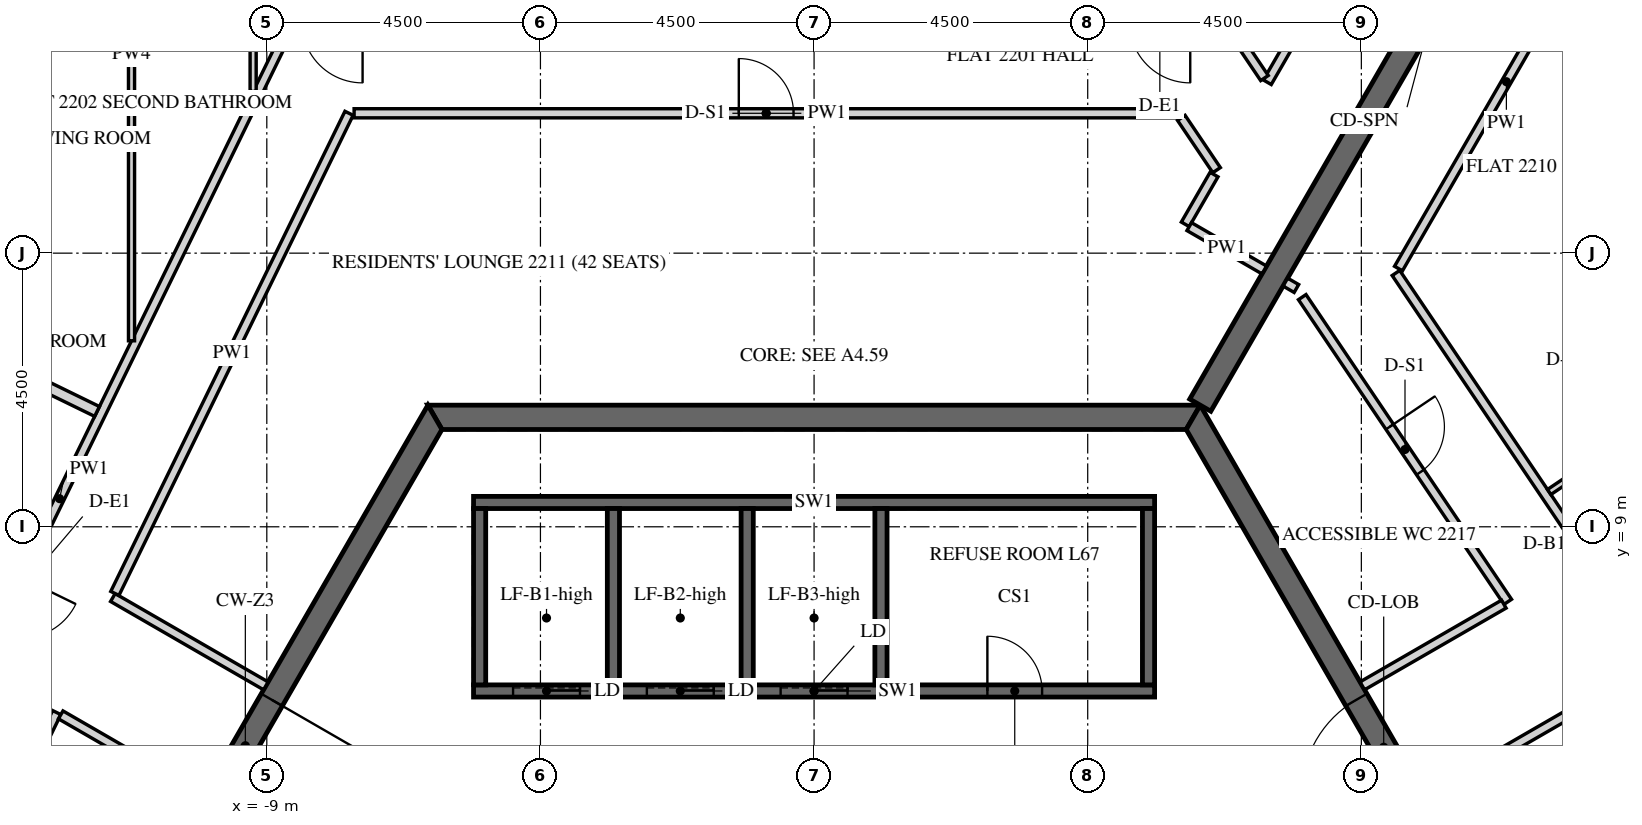
"""IFC4 building model, lengths in metres.
Left out: names, types, materials, properties, quantities, classifications, styles, units other than length and angle.
Written with IfcOpenShell. Run it as: python <this file> out.ifc"""

import sys

from ifc_helpers import new_model, si_unit, direction, frame, frame_2d, origin, place, context, subcontext, project, spatial, polyline, rectangle, outline, extrude, element, fill, save


model = new_model("IFC4")
c1 = context("Model", 3, precision=1e-05, world=origin(), true_north=direction((0.0, 1.0)))
c2 = subcontext(c1, "Body", "Model", "MODEL_VIEW")
j1 = project(units=[si_unit("LENGTHUNIT", "METRE"), si_unit("PLANEANGLEUNIT", "RADIAN")], contexts=[c1])
p1 = place(None, origin())
s1 = spatial("IfcSite", under=j1, at=p1, CompositionType="ELEMENT")
p2 = place(p1, origin())
s2 = spatial("IfcBuilding", under=s1, at=p2, CompositionType="ELEMENT")
p3 = place(p2, frame((0.0, 0.0, 279.6)))
s3 = spatial("IfcBuildingStorey", under=s2, at=p3, CompositionType="ELEMENT", Elevation=279.6)
p4 = place(p3, frame((-6.235, 10.8, -0.15), z_axis=(0.0, 0.0, 1.0), x_axis=(-0.499996419489, -0.866027470984, 0.0)))
e1 = element("IfcWall", 1, at=p4, inside=s3, PredefinedType="SHEAR", context=c2, shape_type="SweptSolid", body=[
    extrude(outline(polyline([(-0.115, -0.2), (12.586, -0.2), (12.355, 0.2), (0.115, 0.2), (-0.115, -0.2)])), origin(), (0.0, 0.0, 1.0), 3.9),
])
p5 = place(p4, frame((5.364, 0.0, 0.15)))
e2 = element("IfcOpeningElement", 2, at=p5, cuts=e1, PredefinedType="OPENING", context=c2, shape_type="SweptSolid", body=[
    extrude(rectangle(XDim=1.8, YDim=2.4, at=frame_2d((0.9, 1.2))), frame((0.0, 0.21, 0.0), z_axis=(0.0, -1.0, 0.0), x_axis=(1.0, 0.0, 0.0)), (0.0, 0.0, 1.0), 0.42),
])
p6 = place(p3, frame((12.471, 0.0, -0.15), z_axis=(0.0, 0.0, 1.0), x_axis=(-0.499996419489, 0.866027470984, 0.0)))
e3 = element("IfcWall", 3, at=p6, inside=s3, PredefinedType="SHEAR", context=c2, shape_type="SweptSolid", body=[
    extrude(outline(polyline([(-0.115, -0.2), (12.586, -0.2), (12.355, 0.2), (0.115, 0.2), (-0.115, -0.2)])), origin(), (0.0, 0.0, 1.0), 3.9),
])
p7 = place(p6, frame((5.306, 0.0, 0.15)))
e4 = element("IfcOpeningElement", 4, at=p7, cuts=e3, PredefinedType="OPENING", context=c2, shape_type="SweptSolid", body=[
    extrude(rectangle(XDim=1.8, YDim=2.4, at=frame_2d((0.9, 1.2))), frame((0.0, 0.21, 0.0), z_axis=(0.0, -1.0, 0.0), x_axis=(1.0, 0.0, 0.0)), (0.0, 0.0, 1.0), 0.42),
])
p8 = place(p3, frame((6.235, 10.8, -0.15), z_axis=(0.0, 0.0, 1.0), x_axis=(-1.0, 0.0, 0.0)))
e5 = element("IfcWall", 5, at=p8, inside=s3, PredefinedType="SHEAR", context=c2, shape_type="SweptSolid", body=[
    extrude(outline(polyline([(-0.115, -0.2), (12.586, -0.2), (12.355, 0.2), (0.115, 0.2), (-0.115, -0.2)])), origin(), (0.0, 0.0, 1.0), 3.9),
])
p9 = place(p3, frame((6.351, 11.0, -0.15), z_axis=(0.0, 0.0, 1.0), x_axis=(0.499998894578, 0.866026041999, 0.0)))
e6 = element("IfcWall", 6, at=p9, inside=s3, PredefinedType="SHEAR", context=c2, shape_type="SweptSolid", body=[
    extrude(rectangle(XDim=15.544, YDim=0.4, at=frame_2d((7.772, 0.0))), origin(), (0.0, 0.0, 1.0), 3.9),
])
p10 = place(p9, frame((6.872, 0.0, 0.15)))
e7 = element("IfcOpeningElement", 7, at=p10, cuts=e6, PredefinedType="OPENING", context=c2, shape_type="SweptSolid", body=[
    extrude(rectangle(XDim=1.8, YDim=2.4, at=frame_2d((0.9, 1.2))), frame((0.0, 0.21, 0.0), z_axis=(0.0, -1.0, 0.0), x_axis=(1.0, 0.0, 0.0)), (0.0, 0.0, 1.0), 0.42),
])
p11 = place(p3, frame((-5.6, 6.3, -0.25), z_axis=(0.0, 0.0, 1.0), x_axis=(1.0, 0.0, 0.0)))
e8 = element("IfcWall", 8, at=p11, inside=s3, PredefinedType="SHEAR", context=c2, shape_type="SweptSolid", body=[
    extrude(rectangle(XDim=11.2, YDim=0.2, at=frame_2d((5.6, 0.0))), origin(), (0.0, 0.0, 1.0), 3.9),
])
p12 = place(p11, frame((8.45, 0.0, 0.25)))
e9 = element("IfcOpeningElement", 9, at=p12, cuts=e8, PredefinedType="OPENING", context=c2, shape_type="SweptSolid", body=[
    extrude(rectangle(XDim=0.9, YDim=2.1, at=frame_2d((0.45, 1.05))), frame((0.0, 0.11, 0.0), z_axis=(0.0, -1.0, 0.0), x_axis=(1.0, 0.0, 0.0)), (0.0, 0.0, 1.0), 0.22),
])
p13 = place(p11, frame((0.65, 0.0, 0.25)))
e10 = element("IfcOpeningElement", 10, at=p13, cuts=e8, PredefinedType="OPENING", context=c2, shape_type="SweptSolid", body=[
    extrude(rectangle(XDim=1.1, YDim=2.1, at=frame_2d((0.55, 1.05))), frame((0.0, 0.11, 0.0), z_axis=(0.0, -1.0, 0.0), x_axis=(1.0, 0.0, 0.0)), (0.0, 0.0, 1.0), 0.22),
])
p14 = place(p11, frame((2.85, 0.0, 0.25)))
e11 = element("IfcOpeningElement", 11, at=p14, cuts=e8, PredefinedType="OPENING", context=c2, shape_type="SweptSolid", body=[
    extrude(rectangle(XDim=1.1, YDim=2.1, at=frame_2d((0.55, 1.05))), frame((0.0, 0.11, 0.0), z_axis=(0.0, -1.0, 0.0), x_axis=(1.0, 0.0, 0.0)), (0.0, 0.0, 1.0), 0.22),
])
p15 = place(p11, frame((5.05, 0.0, 0.25)))
e12 = element("IfcOpeningElement", 12, at=p15, cuts=e8, PredefinedType="OPENING", context=c2, shape_type="SweptSolid", body=[
    extrude(rectangle(XDim=1.1, YDim=2.1, at=frame_2d((0.55, 1.05))), frame((0.0, 0.11, 0.0), z_axis=(0.0, -1.0, 0.0), x_axis=(1.0, 0.0, 0.0)), (0.0, 0.0, 1.0), 0.22),
])
p16 = place(p3, frame((-5.6, 9.4, -0.25), z_axis=(0.0, 0.0, 1.0), x_axis=(1.0, 0.0, 0.0)))
e13 = element("IfcWall", 13, at=p16, inside=s3, PredefinedType="SHEAR", context=c2, shape_type="SweptSolid", body=[
    extrude(rectangle(XDim=11.2, YDim=0.2, at=frame_2d((5.6, 0.0))), origin(), (0.0, 0.0, 1.0), 3.9),
])
for number, where, z_axis, x_axis in (
    (14, (-5.5, 6.4, -0.25), (0.0, 0.0, 1.0), (0.0, 1.0, 0.0)),
    (15, (-3.3, 6.4, -0.25), (0.0, 0.0, 1.0), (0.0, 1.0, 0.0)),
    (16, (-1.1, 6.4, -0.25), (0.0, 0.0, 1.0), (0.0, 1.0, 0.0)),
    (17, (1.1, 6.4, -0.25), (0.0, 0.0, 1.0), (0.0, 1.0, 0.0)),
    (18, (5.5, 6.4, -0.25), (0.0, 0.0, 1.0), (0.0, 1.0, 0.0)),
):
    element("IfcWall", number, at=place(p3, frame(where, z_axis=z_axis, x_axis=x_axis)), inside=s3, PredefinedType="SHEAR", context=c2, shape_type="SweptSolid", body=[
        extrude(rectangle(XDim=2.9, YDim=0.2, at=frame_2d((1.45, 0.0))), origin(), (0.0, 0.0, 1.0), 3.9),
    ])
p17 = place(p3, frame((8.711, 18.488, 0.0), z_axis=(0.0, 0.0, 1.0), x_axis=(-0.500075402517, -0.865981865744, 0.0)))
e19 = element("IfcWall", 19, at=p17, inside=s3, PredefinedType="PARTITIONING", context=c2, shape_type="SweptSolid", body=[
    extrude(rectangle(XDim=2.515, YDim=0.15, at=frame_2d((1.257, 0.0))), origin(), (0.0, 0.0, 1.0), 2.988),
])
p18 = place(p3, frame((7.407, 16.379, 0.0), z_axis=(0.0, 0.0, 1.0), x_axis=(-0.559111060147, 0.829092770697, 0.0)))
e20 = element("IfcWall", 20, at=p18, inside=s3, PredefinedType="PARTITIONING", context=c2, shape_type="SweptSolid", body=[
    extrude(rectangle(XDim=1.02, YDim=0.15, at=frame_2d((0.51, 0.0))), origin(), (0.0, 0.0, 1.0), 2.988),
])
p19 = place(p3, frame((-8.622, 17.225, 0.0), z_axis=(0.0, 0.0, 1.0), x_axis=(-0.438366544921, -0.898796290765, 0.0)))
e21 = element("IfcWall", 21, at=p19, inside=s3, PredefinedType="PARTITIONING", context=c2, shape_type="SweptSolid", body=[
    extrude(rectangle(XDim=17.273, YDim=0.15, at=frame_2d((8.637, 0.0))), origin(), (0.0, 0.0, 1.0), 2.988),
])
p20 = place(p19, frame((10.078, 0.0, 0.0)))
e22 = element("IfcOpeningElement", 22, at=p20, cuts=e21, PredefinedType="OPENING", context=c2, shape_type="SweptSolid", body=[
    extrude(rectangle(XDim=1.0, YDim=2.1, at=frame_2d((0.5, 1.05))), frame((0.0, 0.085, 0.0), z_axis=(0.0, -1.0, 0.0), x_axis=(1.0, 0.0, 0.0)), (0.0, 0.0, 1.0), 0.17),
])
p21 = place(p3, frame((-9.016, 6.384, 0.0), z_axis=(0.0, 0.0, 1.0), x_axis=(-0.866010648346, 0.500025556299, 0.0)))
e23 = element("IfcWall", 23, at=p21, inside=s3, PredefinedType="PARTITIONING", context=c2, shape_type="SweptSolid", body=[
    extrude(rectangle(XDim=2.905, YDim=0.15, at=frame_2d((1.453, 0.0))), origin(), (0.0, 0.0, 1.0), 2.988),
])
p22 = place(p3, frame((-11.499, 7.905, 0.0), z_axis=(0.0, 0.0, 1.0), x_axis=(0.438365041944, 0.898797023805, 0.0)))
e24 = element("IfcWall", 24, at=p22, inside=s3, PredefinedType="PARTITIONING", context=c2, shape_type="SweptSolid", body=[
    extrude(rectangle(XDim=8.784, YDim=0.15, at=frame_2d((4.392, 0.0))), origin(), (0.0, 0.0, 1.0), 2.988),
])
p23 = place(p3, frame((-7.564, 15.8, 0.0), z_axis=(0.0, 0.0, 1.0), x_axis=(1.0, 0.0, 0.0)))
e25 = element("IfcWall", 25, at=p23, inside=s3, PredefinedType="PARTITIONING", context=c2, shape_type="SweptSolid", body=[
    extrude(rectangle(XDim=13.553, YDim=0.15, at=frame_2d((6.776, 0.0))), origin(), (0.0, 0.0, 1.0), 2.988),
])
p24 = place(p23, frame((6.326, 0.0, 0.0)))
e26 = element("IfcOpeningElement", 26, at=p24, cuts=e25, PredefinedType="OPENING", context=c2, shape_type="SweptSolid", body=[
    extrude(rectangle(XDim=0.9, YDim=2.1, at=frame_2d((0.45, 1.05))), frame((0.0, 0.085, 0.0), z_axis=(0.0, -1.0, 0.0), x_axis=(1.0, 0.0, 0.0)), (0.0, 0.0, 1.0), 0.17),
])
p25 = place(p3, frame((6.039, 15.725, 0.0), z_axis=(0.0, 0.0, 1.0), x_axis=(0.559307154107, -0.828960498073, 0.0)))
e27 = element("IfcWall", 27, at=p25, inside=s3, PredefinedType="PARTITIONING", context=c2, shape_type="SweptSolid", body=[
    extrude(rectangle(XDim=1.038, YDim=0.15, at=frame_2d((0.519, 0.0))), origin(), (0.0, 0.0, 1.0), 2.988),
])
p26 = place(p3, frame((6.578, 14.793, 0.0), z_axis=(0.0, 0.0, 1.0), x_axis=(-0.499998034377, -0.866026538634, 0.0)))
e28 = element("IfcWall", 28, at=p26, inside=s3, PredefinedType="PARTITIONING", context=c2, shape_type="SweptSolid", body=[
    extrude(rectangle(XDim=0.946, YDim=0.15, at=frame_2d((0.473, 0.0))), origin(), (0.0, 0.0, 1.0), 2.988),
])
p27 = place(p3, frame((6.17, 13.936, 0.0), z_axis=(0.0, 0.0, 1.0), x_axis=(0.865988727248, -0.500063520245, 0.0)))
e29 = element("IfcWall", 29, at=p27, inside=s3, PredefinedType="PARTITIONING", context=c2, shape_type="SweptSolid", body=[
    extrude(rectangle(XDim=1.425, YDim=0.15, at=frame_2d((0.712, 0.0))), origin(), (0.0, 0.0, 1.0), 2.988),
])
p28 = place(p3, frame((-15.079, 0.564, 0.0), z_axis=(0.0, 0.0, 1.0), x_axis=(0.438367391904, 0.898795877669, 0.0)))
e30 = element("IfcWall", 30, at=p28, inside=s3, PredefinedType="PARTITIONING", context=c2, shape_type="SweptSolid", body=[
    extrude(rectangle(XDim=5.987, YDim=0.15, at=frame_2d((2.994, 0.0))), origin(), (0.0, 0.0, 1.0), 2.988),
])
p29 = place(p28, frame((2.543, 0.0, 0.0)))
e31 = element("IfcOpeningElement", 31, at=p29, cuts=e30, PredefinedType="OPENING", context=c2, shape_type="SweptSolid", body=[
    extrude(rectangle(XDim=0.9, YDim=2.1, at=frame_2d((0.45, 1.05))), frame((0.0, 0.085, 0.0), z_axis=(0.0, -1.0, 0.0), x_axis=(1.0, 0.0, 0.0)), (0.0, 0.0, 1.0), 0.17),
])
p30 = place(p3, frame((-12.389, 5.907, 0.0), z_axis=(0.0, 0.0, 1.0), x_axis=(0.866034066097, -0.499984996134, 0.0)))
e32 = element("IfcWall", 32, at=p30, inside=s3, PredefinedType="PARTITIONING", context=c2, shape_type="SweptSolid", body=[
    extrude(rectangle(XDim=2.683, YDim=0.15, at=frame_2d((1.342, 0.0))), origin(), (0.0, 0.0, 1.0), 2.988),
])
p31 = place(p3, frame((19.228, -1.146, 0.0), z_axis=(0.0, 0.0, 1.0), x_axis=(-0.559173750718, 0.829050490928, 0.0)))
e33 = element("IfcWall", 33, at=p31, inside=s3, PredefinedType="PARTITIONING", context=c2, shape_type="SweptSolid", body=[
    extrude(rectangle(XDim=17.273, YDim=0.15, at=frame_2d((8.637, 0.0))), origin(), (0.0, 0.0, 1.0), 2.988),
])
p32 = place(p31, frame((9.478, 0.0, 0.0)))
e34 = element("IfcOpeningElement", 34, at=p32, cuts=e33, PredefinedType="OPENING", context=c2, shape_type="SweptSolid", body=[
    extrude(rectangle(XDim=1.0, YDim=2.1, at=frame_2d((0.5, 1.05))), frame((0.0, 0.085, 0.0), z_axis=(0.0, -1.0, 0.0), x_axis=(1.0, 0.0, 0.0)), (0.0, 0.0, 1.0), 0.17),
])
p33 = place(p3, frame((9.611, 13.246, 0.0), z_axis=(0.0, 0.0, 1.0), x_axis=(0.499994435258, 0.866028616566, 0.0)))
e35 = element("IfcWall", 35, at=p33, inside=s3, PredefinedType="PARTITIONING", context=c2, shape_type="SweptSolid", body=[
    extrude(rectangle(XDim=7.097, YDim=0.15, at=frame_2d((3.548, 0.0))), origin(), (0.0, 0.0, 1.0), 2.988),
])
p34 = place(p3, frame((10.066, 4.566, 0.0), z_axis=(0.0, 0.0, 1.0), x_axis=(0.866034661658, 0.49998396455, 0.0)))
e36 = element("IfcWall", 36, at=p34, inside=s3, PredefinedType="PARTITIONING", context=c2, shape_type="SweptSolid", body=[
    extrude(rectangle(XDim=2.909, YDim=0.15, at=frame_2d((1.455, 0.0))), origin(), (0.0, 0.0, 1.0), 2.988),
])
p35 = place(p3, frame((7.75, 13.024, 0.0), z_axis=(0.0, 0.0, 1.0), x_axis=(0.866088799389, -0.499890179513, 0.0)))
e37 = element("IfcWall", 37, at=p35, inside=s3, PredefinedType="PARTITIONING", context=c2, shape_type="SweptSolid", body=[
    extrude(rectangle(XDim=0.21, YDim=0.15, at=frame_2d((0.105, 0.0))), origin(), (0.0, 0.0, 1.0), 2.988),
])
p36 = place(p3, frame((8.028, 12.777, 0.0), z_axis=(0.0, 0.0, 1.0), x_axis=(0.559175239609, -0.829049486707, 0.0)))
e38 = element("IfcWall", 38, at=p36, inside=s3, PredefinedType="PARTITIONING", context=c2, shape_type="SweptSolid", body=[
    extrude(rectangle(XDim=6.045, YDim=0.15, at=frame_2d((3.022, 0.0))), origin(), (0.0, 0.0, 1.0), 2.988),
])
p37 = place(p36, frame((2.572, 0.0, 0.0)))
e39 = element("IfcOpeningElement", 39, at=p37, cuts=e38, PredefinedType="OPENING", context=c2, shape_type="SweptSolid", body=[
    extrude(rectangle(XDim=0.9, YDim=2.1, at=frame_2d((0.45, 1.05))), frame((0.0, 0.085, 0.0), z_axis=(0.0, -1.0, 0.0), x_axis=(1.0, 0.0, 0.0)), (0.0, 0.0, 1.0), 0.17),
])
p38 = place(p3, frame((11.343, 7.728, 0.0), z_axis=(0.0, 0.0, 1.0), x_axis=(-0.866037314867, -0.499979368833, 0.0)))
e40 = element("IfcWall", 40, at=p38, inside=s3, PredefinedType="PARTITIONING", context=c2, shape_type="SweptSolid", body=[
    extrude(rectangle(XDim=2.687, YDim=0.15, at=frame_2d((1.344, 0.0))), origin(), (0.0, 0.0, 1.0), 2.988),
])
p39 = place(p3, frame((-11.225, 12.059, 0.0), z_axis=(0.0, 0.0, 1.0), x_axis=(0.0, 1.0, 0.0)))
e41 = element("IfcWall", 41, at=p39, inside=s3, PredefinedType="PARTITIONING", context=c2, shape_type="SweptSolid", body=[
    extrude(rectangle(XDim=9.441, YDim=0.1, at=frame_2d((4.721, 0.0))), origin(), (0.0, 0.0, 1.0), 2.988),
])
p40 = place(p3, frame((-19.094, 14.458, 0.0), z_axis=(0.0, 0.0, 1.0), x_axis=(0.898794723364, -0.438369758597, 0.0)))
e42 = element("IfcWall", 42, at=p40, inside=s3, PredefinedType="PARTITIONING", context=c2, shape_type="SweptSolid", body=[
    extrude(rectangle(XDim=8.125, YDim=0.18, at=frame_2d((4.062, 0.0))), origin(), (0.0, 0.0, 1.0), 2.988),
])
p41 = place(p3, frame((-9.225, 21.5, 0.0), z_axis=(0.0, 0.0, 1.0), x_axis=(0.0, -1.0, 0.0)))
e43 = element("IfcWall", 43, at=p41, inside=s3, PredefinedType="PARTITIONING", context=c2, shape_type="SweptSolid", body=[
    extrude(rectangle(XDim=5.341, YDim=0.1, at=frame_2d((2.67, 0.0))), origin(), (0.0, 0.0, 1.0), 2.988),
])
p42 = place(p41, frame((1.7, 0.0, 0.0)))
e44 = element("IfcOpeningElement", 44, at=p42, cuts=e43, PredefinedType="OPENING", context=c2, shape_type="SweptSolid", body=[
    extrude(rectangle(XDim=0.8, YDim=2.1, at=frame_2d((0.4, 1.05))), frame((0.0, 0.06, 0.0), z_axis=(0.0, -1.0, 0.0), x_axis=(1.0, 0.0, 0.0)), (0.0, 0.0, 1.0), 0.12),
])
p43 = place(p3, frame((12.089, 9.572, 0.0), z_axis=(0.0, 0.0, 1.0), x_axis=(0.829046031219, 0.559180362781, 0.0)))
e45 = element("IfcWall", 45, at=p43, inside=s3, PredefinedType="PARTITIONING", context=c2, shape_type="SweptSolid", body=[
    extrude(rectangle(XDim=2.925, YDim=0.1, at=frame_2d((1.462, 0.0))), origin(), (0.0, 0.0, 1.0), 2.988),
])
p44 = place(p5, origin())
e46 = element("IfcDoor", 46, at=p44, inside=s3, OperationType="DOUBLE_DOOR_SINGLE_SWING", PredefinedType="DOOR", context=c2, shape_type="SweptSolid", body=[
    extrude(rectangle(XDim=1.8, YDim=2.4, at=frame_2d((0.9, 1.2))), frame((0.0, 0.025, 0.0), z_axis=(0.0, -1.0, 0.0), x_axis=(1.0, 0.0, 0.0)), (0.0, 0.0, 1.0), 0.05),
])
fill(e2, e46)
p45 = place(p7, origin())
e47 = element("IfcDoor", 47, at=p45, inside=s3, OperationType="DOUBLE_DOOR_SINGLE_SWING", PredefinedType="DOOR", context=c2, shape_type="SweptSolid", body=[
    extrude(rectangle(XDim=1.8, YDim=2.4, at=frame_2d((0.9, 1.2))), frame((0.0, 0.025, 0.0), z_axis=(0.0, -1.0, 0.0), x_axis=(1.0, 0.0, 0.0)), (0.0, 0.0, 1.0), 0.05),
])
fill(e4, e47)
p46 = place(p12, origin())
e48 = element("IfcDoor", 48, at=p46, inside=s3, OperationType="SINGLE_SWING_LEFT", PredefinedType="DOOR", context=c2, shape_type="SweptSolid", body=[
    extrude(rectangle(XDim=0.9, YDim=2.1, at=frame_2d((0.45, 1.05))), frame((0.0, 0.025, 0.0), z_axis=(0.0, -1.0, 0.0), x_axis=(1.0, 0.0, 0.0)), (0.0, 0.0, 1.0), 0.05),
])
fill(e9, e48)
p47 = place(p13, origin())
e49 = element("IfcDoor", 49, at=p47, inside=s3, OperationType="SLIDING_TO_LEFT", PredefinedType="DOOR", context=c2, shape_type="SweptSolid", body=[
    extrude(rectangle(XDim=1.1, YDim=2.1, at=frame_2d((0.55, 1.05))), frame((0.0, 0.025, 0.0), z_axis=(0.0, -1.0, 0.0), x_axis=(1.0, 0.0, 0.0)), (0.0, 0.0, 1.0), 0.05),
])
fill(e10, e49)
p48 = place(p14, origin())
e50 = element("IfcDoor", 50, at=p48, inside=s3, OperationType="SLIDING_TO_LEFT", PredefinedType="DOOR", context=c2, shape_type="SweptSolid", body=[
    extrude(rectangle(XDim=1.1, YDim=2.1, at=frame_2d((0.55, 1.05))), frame((0.0, 0.025, 0.0), z_axis=(0.0, -1.0, 0.0), x_axis=(1.0, 0.0, 0.0)), (0.0, 0.0, 1.0), 0.05),
])
fill(e11, e50)
p49 = place(p15, origin())
e51 = element("IfcDoor", 51, at=p49, inside=s3, OperationType="SLIDING_TO_LEFT", PredefinedType="DOOR", context=c2, shape_type="SweptSolid", body=[
    extrude(rectangle(XDim=1.1, YDim=2.1, at=frame_2d((0.55, 1.05))), frame((0.0, 0.025, 0.0), z_axis=(0.0, -1.0, 0.0), x_axis=(1.0, 0.0, 0.0)), (0.0, 0.0, 1.0), 0.05),
])
fill(e12, e51)
p50 = place(p24, origin())
e52 = element("IfcDoor", 52, at=p50, inside=s3, OperationType="SINGLE_SWING_LEFT", PredefinedType="DOOR", context=c2, shape_type="SweptSolid", body=[
    extrude(rectangle(XDim=0.9, YDim=2.1, at=frame_2d((0.45, 1.05))), frame((0.0, 0.025, 0.0), z_axis=(0.0, -1.0, 0.0), x_axis=(1.0, 0.0, 0.0)), (0.0, 0.0, 1.0), 0.05),
])
fill(e26, e52)
p51 = place(p37, origin())
e53 = element("IfcDoor", 53, at=p51, inside=s3, OperationType="SINGLE_SWING_RIGHT", PredefinedType="DOOR", context=c2, shape_type="SweptSolid", body=[
    extrude(rectangle(XDim=0.9, YDim=2.1, at=frame_2d((0.45, 1.05))), frame((0.0, 0.025, 0.0), z_axis=(0.0, -1.0, 0.0), x_axis=(1.0, 0.0, 0.0)), (0.0, 0.0, 1.0), 0.05),
])
fill(e39, e53)
save(model, sys.argv[1])
